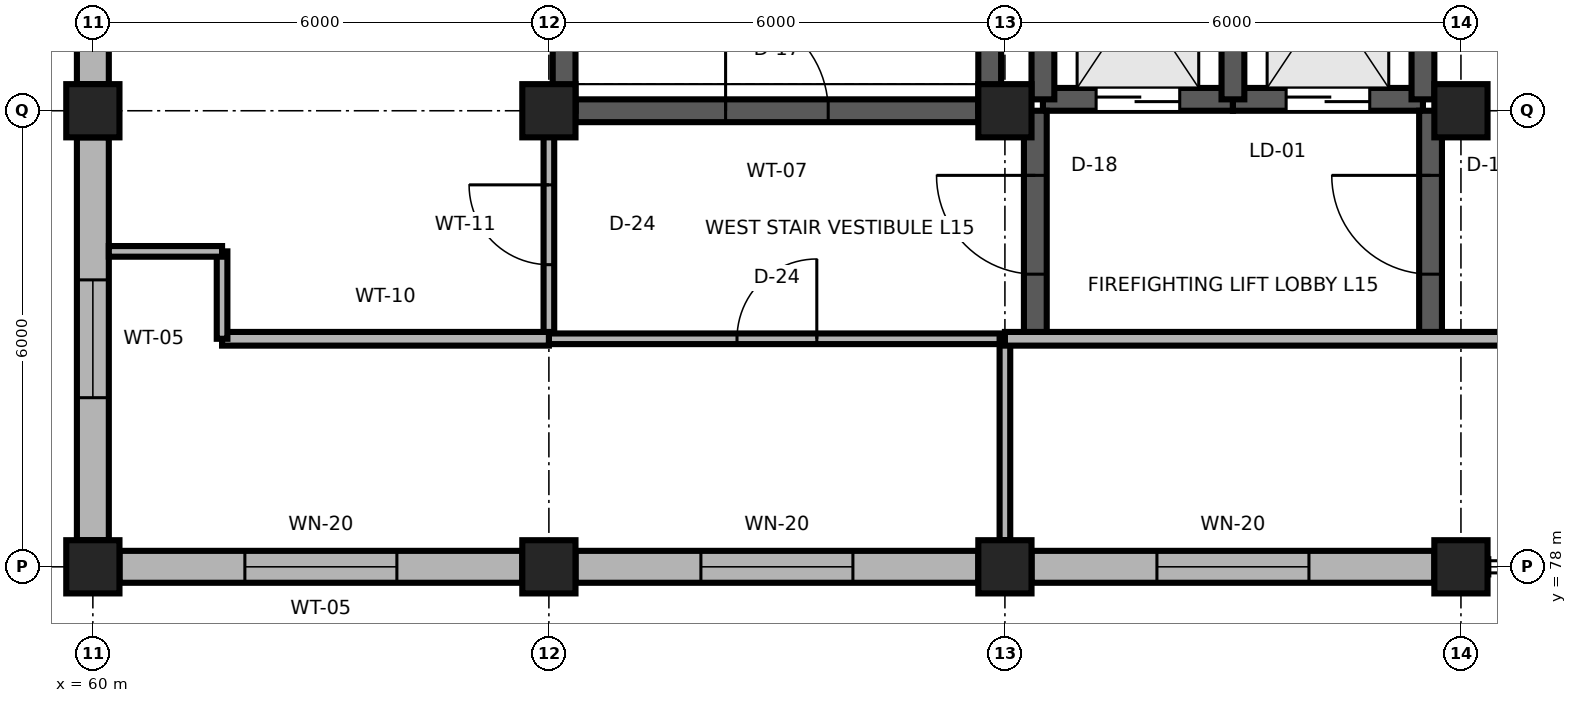
"""IFC4 building model, lengths in metres.
Left out: names, types, materials, properties, quantities, classifications, styles, units other than length and angle.
Written with IfcOpenShell. Run it as: python <this file> out.ifc"""

import sys

from ifc_helpers import new_model, si_unit, direction, frame, frame_2d, origin, origin_2d, place, context, subcontext, project, spatial, rectangle, extrude, element, fill, save


model = new_model("IFC4")
c1 = context("Model", 3, precision=1e-05, world=origin(), true_north=direction((0.0, 1.0)))
c2 = subcontext(c1, "Body", "Model", "MODEL_VIEW")
j1 = project(units=[si_unit("LENGTHUNIT", "METRE"), si_unit("PLANEANGLEUNIT", "RADIAN")], contexts=[c1])
p1 = place(None, origin())
s1 = spatial("IfcSite", under=j1, at=p1, CompositionType="ELEMENT")
p2 = place(p1, origin())
s2 = spatial("IfcBuilding", under=s1, at=p2, CompositionType="ELEMENT")
p3 = place(p2, frame((0.0, 0.0, 60.0)))
s3 = spatial("IfcBuildingStorey", under=s2, at=p3, CompositionType="ELEMENT", Elevation=60.0)
for number, where, z_axis, x_axis in (
    (1, (60.0, 78.0, 0.0), (0.0, 0.0, 1.0), (1.0, 0.0, 0.0)),
    (2, (66.0, 78.0, 0.0), (0.0, 0.0, 1.0), (1.0, 0.0, 0.0)),
    (3, (72.0, 78.0, 0.0), (0.0, 0.0, 1.0), (1.0, 0.0, 0.0)),
    (4, (78.0, 78.0, 0.0), (0.0, 0.0, 1.0), (1.0, 0.0, 0.0)),
    (5, (60.0, 84.0, 0.0), (0.0, 0.0, 1.0), (1.0, 0.0, 0.0)),
    (6, (66.0, 84.0, 0.0), (0.0, 0.0, 1.0), (1.0, 0.0, 0.0)),
    (7, (72.0, 84.0, 0.0), (0.0, 0.0, 1.0), (1.0, 0.0, 0.0)),
    (8, (78.0, 84.0, 0.0), (0.0, 0.0, 1.0), (1.0, 0.0, 0.0)),
):
    element("IfcColumn", number, at=place(p3, frame(where, z_axis=z_axis, x_axis=x_axis)), inside=s3, PredefinedType="COLUMN", context=c2, shape_type="SweptSolid", body=[
        extrude(rectangle(XDim=0.7, YDim=0.7, at=origin_2d()), origin(), (0.0, 0.0, 1.0), 3.9),
    ])
p4 = place(p3, frame((60.35, 78.0, 0.0), z_axis=(0.0, 0.0, 1.0), x_axis=(1.0, 0.0, 0.0)))
e9 = element("IfcWall", 9, at=p4, inside=s3, PredefinedType="SOLIDWALL", context=c2, shape_type="SweptSolid", body=[
    extrude(rectangle(XDim=5.3, YDim=0.42, at=frame_2d((2.65, 0.0))), origin(), (0.0, 0.0, 1.0), 3.32),
])
p5 = place(p4, frame((1.65, 0.0, 0.85)))
e10 = element("IfcOpeningElement", 10, at=p5, cuts=e9, PredefinedType="OPENING", context=c2, shape_type="SweptSolid", body=[
    extrude(rectangle(XDim=2.0, YDim=1.95, at=frame_2d((1.0, 0.975))), frame((0.0, 0.225, 0.0), z_axis=(0.0, -1.0, 0.0), x_axis=(1.0, 0.0, 0.0)), (0.0, 0.0, 1.0), 0.45),
])
p6 = place(p3, frame((66.35, 78.0, 0.0), z_axis=(0.0, 0.0, 1.0), x_axis=(1.0, 0.0, 0.0)))
e11 = element("IfcWall", 11, at=p6, inside=s3, PredefinedType="SOLIDWALL", context=c2, shape_type="SweptSolid", body=[
    extrude(rectangle(XDim=5.3, YDim=0.42, at=frame_2d((2.65, 0.0))), origin(), (0.0, 0.0, 1.0), 3.32),
])
p7 = place(p6, frame((1.65, 0.0, 0.85)))
e12 = element("IfcOpeningElement", 12, at=p7, cuts=e11, PredefinedType="OPENING", context=c2, shape_type="SweptSolid", body=[
    extrude(rectangle(XDim=2.0, YDim=1.95, at=frame_2d((1.0, 0.975))), frame((0.0, 0.225, 0.0), z_axis=(0.0, -1.0, 0.0), x_axis=(1.0, 0.0, 0.0)), (0.0, 0.0, 1.0), 0.45),
])
p8 = place(p3, frame((72.35, 78.0, 0.0), z_axis=(0.0, 0.0, 1.0), x_axis=(1.0, 0.0, 0.0)))
e13 = element("IfcWall", 13, at=p8, inside=s3, PredefinedType="SOLIDWALL", context=c2, shape_type="SweptSolid", body=[
    extrude(rectangle(XDim=5.3, YDim=0.42, at=frame_2d((2.65, 0.0))), origin(), (0.0, 0.0, 1.0), 3.32),
])
p9 = place(p8, frame((1.65, 0.0, 0.85)))
e14 = element("IfcOpeningElement", 14, at=p9, cuts=e13, PredefinedType="OPENING", context=c2, shape_type="SweptSolid", body=[
    extrude(rectangle(XDim=2.0, YDim=1.95, at=frame_2d((1.0, 0.975))), frame((0.0, 0.225, 0.0), z_axis=(0.0, -1.0, 0.0), x_axis=(1.0, 0.0, 0.0)), (0.0, 0.0, 1.0), 0.45),
])
p10 = place(p3, frame((60.0, 78.35, 0.0), z_axis=(0.0, 0.0, 1.0), x_axis=(0.0, 1.0, 0.0)))
e15 = element("IfcWall", 15, at=p10, inside=s3, PredefinedType="SOLIDWALL", context=c2, shape_type="SweptSolid", body=[
    extrude(rectangle(XDim=5.3, YDim=0.42, at=frame_2d((2.65, 0.0))), origin(), (0.0, 0.0, 1.0), 3.32),
])
p11 = place(p10, frame((1.875, 0.0, 0.85)))
e16 = element("IfcOpeningElement", 16, at=p11, cuts=e15, PredefinedType="OPENING", context=c2, shape_type="SweptSolid", body=[
    extrude(rectangle(XDim=1.55, YDim=1.9, at=frame_2d((0.775, 0.95))), frame((0.0, 0.225, 0.0), z_axis=(0.0, -1.0, 0.0), x_axis=(1.0, 0.0, 0.0)), (0.0, 0.0, 1.0), 0.45),
])
p12 = place(p3, frame((60.0, 84.35, 0.0), z_axis=(0.0, 0.0, 1.0), x_axis=(0.0, 1.0, 0.0)))
e17 = element("IfcWall", 17, at=p12, inside=s3, PredefinedType="SOLIDWALL", context=c2, shape_type="SweptSolid", body=[
    extrude(rectangle(XDim=5.3, YDim=0.42, at=frame_2d((2.65, 0.0))), origin(), (0.0, 0.0, 1.0), 3.32),
])
p13 = place(p12, frame((1.875, 0.0, 0.85)))
e18 = element("IfcOpeningElement", 18, at=p13, cuts=e17, PredefinedType="OPENING", context=c2, shape_type="SweptSolid", body=[
    extrude(rectangle(XDim=1.55, YDim=1.9, at=frame_2d((0.775, 0.95))), frame((0.0, 0.225, 0.0), z_axis=(0.0, -1.0, 0.0), x_axis=(1.0, 0.0, 0.0)), (0.0, 0.0, 1.0), 0.45),
])
p14 = place(p3, frame((66.35, 84.0, 0.0), z_axis=(0.0, 0.0, 1.0), x_axis=(1.0, 0.0, 0.0)))
e19 = element("IfcWall", 19, at=p14, inside=s3, PredefinedType="SHEAR", context=c2, shape_type="SweptSolid", body=[
    extrude(rectangle(XDim=5.3, YDim=0.3, at=frame_2d((2.65, 0.0))), origin(), (0.0, 0.0, 1.0), 3.66),
])
p15 = place(p14, frame((1.975, 0.0, 0.0)))
e20 = element("IfcOpeningElement", 20, at=p15, cuts=e19, PredefinedType="OPENING", context=c2, shape_type="SweptSolid", body=[
    extrude(rectangle(XDim=1.35, YDim=2.2, at=frame_2d((0.675, 1.1))), frame((0.0, 0.165, 0.0), z_axis=(0.0, -1.0, 0.0), x_axis=(1.0, 0.0, 0.0)), (0.0, 0.0, 1.0), 0.33),
])
for number, where, z_axis, x_axis in (
    (21, (66.2, 84.0, 0.0), (0.0, 0.0, 1.0), (0.0, 1.0, 0.0)),
    (22, (71.8, 84.0, 0.0), (0.0, 0.0, 1.0), (0.0, 1.0, 0.0)),
):
    element("IfcWall", number, at=place(p3, frame(where, z_axis=z_axis, x_axis=x_axis)), inside=s3, PredefinedType="SHEAR", context=c2, shape_type="SweptSolid", body=[
        extrude(rectangle(XDim=11.8, YDim=0.3, at=frame_2d((5.9, 0.0))), origin(), (0.0, 0.0, 1.0), 3.74),
    ])
p16 = place(p3, frame((72.5, 84.15, 0.0), z_axis=(0.0, 0.0, 1.0), x_axis=(1.0, 0.0, 0.0)))
e23 = element("IfcWall", 23, at=p16, inside=s3, PredefinedType="SHEAR", context=c2, shape_type="SweptSolid", body=[
    extrude(rectangle(XDim=2.5, YDim=0.3, at=frame_2d((1.25, 0.0))), origin(), (0.0, 0.0, 1.0), 3.74),
])
p17 = place(p16, frame((0.7, 0.0, 0.0)))
e24 = element("IfcOpeningElement", 24, at=p17, cuts=e23, PredefinedType="OPENING", context=c2, shape_type="SweptSolid", body=[
    extrude(rectangle(XDim=1.1, YDim=2.1, at=frame_2d((0.55, 1.05))), frame((0.0, 0.165, 0.0), z_axis=(0.0, -1.0, 0.0), x_axis=(1.0, 0.0, 0.0)), (0.0, 0.0, 1.0), 0.33),
])
p18 = place(p3, frame((72.5, 84.15, 0.0), z_axis=(0.0, 0.0, 1.0), x_axis=(0.0, 1.0, 0.0)))
e25 = element("IfcWall", 25, at=p18, inside=s3, PredefinedType="SHEAR", context=c2, shape_type="SweptSolid", body=[
    extrude(rectangle(XDim=3.4, YDim=0.3, at=frame_2d((1.7, 0.0))), origin(), (0.0, 0.0, 1.0), 3.74),
])
p19 = place(p3, frame((75.0, 84.15, 0.0), z_axis=(0.0, 0.0, 1.0), x_axis=(1.0, 0.0, 0.0)))
e26 = element("IfcWall", 26, at=p19, inside=s3, PredefinedType="SHEAR", context=c2, shape_type="SweptSolid", body=[
    extrude(rectangle(XDim=2.5, YDim=0.3, at=frame_2d((1.25, 0.0))), origin(), (0.0, 0.0, 1.0), 3.74),
])
p20 = place(p19, frame((0.7, 0.0, 0.0)))
e27 = element("IfcOpeningElement", 27, at=p20, cuts=e26, PredefinedType="OPENING", context=c2, shape_type="SweptSolid", body=[
    extrude(rectangle(XDim=1.1, YDim=2.1, at=frame_2d((0.55, 1.05))), frame((0.0, 0.165, 0.0), z_axis=(0.0, -1.0, 0.0), x_axis=(1.0, 0.0, 0.0)), (0.0, 0.0, 1.0), 0.33),
])
for number, where, z_axis, x_axis in (
    (28, (75.0, 84.15, 0.0), (0.0, 0.0, 1.0), (0.0, 1.0, 0.0)),
    (29, (77.5, 84.15, 0.0), (0.0, 0.0, 1.0), (0.0, 1.0, 0.0)),
):
    element("IfcWall", number, at=place(p3, frame(where, z_axis=z_axis, x_axis=x_axis)), inside=s3, PredefinedType="SHEAR", context=c2, shape_type="SweptSolid", body=[
        extrude(rectangle(XDim=3.4, YDim=0.3, at=frame_2d((1.7, 0.0))), origin(), (0.0, 0.0, 1.0), 3.74),
    ])
p21 = place(p3, frame((72.4, 81.0, 0.0), z_axis=(0.0, 0.0, 1.0), x_axis=(0.0, 1.0, 0.0)))
e30 = element("IfcWall", 30, at=p21, inside=s3, PredefinedType="SHEAR", context=c2, shape_type="SweptSolid", body=[
    extrude(rectangle(XDim=3.0, YDim=0.3, at=frame_2d((1.5, 0.0))), origin(), (0.0, 0.0, 1.0), 3.74),
])
p22 = place(p21, frame((0.85, 0.0, 0.0)))
e31 = element("IfcOpeningElement", 31, at=p22, cuts=e30, PredefinedType="OPENING", context=c2, shape_type="SweptSolid", body=[
    extrude(rectangle(XDim=1.3, YDim=2.2, at=frame_2d((0.65, 1.1))), frame((0.0, 0.165, 0.0), z_axis=(0.0, -1.0, 0.0), x_axis=(1.0, 0.0, 0.0)), (0.0, 0.0, 1.0), 0.33),
])
p23 = place(p3, frame((77.6, 81.0, 0.0), z_axis=(0.0, 0.0, 1.0), x_axis=(0.0, 1.0, 0.0)))
e32 = element("IfcWall", 32, at=p23, inside=s3, PredefinedType="SHEAR", context=c2, shape_type="SweptSolid", body=[
    extrude(rectangle(XDim=3.0, YDim=0.3, at=frame_2d((1.5, 0.0))), origin(), (0.0, 0.0, 1.0), 3.74),
])
p24 = place(p23, frame((0.85, 0.0, 0.0)))
e33 = element("IfcOpeningElement", 33, at=p24, cuts=e32, PredefinedType="OPENING", context=c2, shape_type="SweptSolid", body=[
    extrude(rectangle(XDim=1.3, YDim=2.2, at=frame_2d((0.65, 1.1))), frame((0.0, 0.165, 0.0), z_axis=(0.0, -1.0, 0.0), x_axis=(1.0, 0.0, 0.0)), (0.0, 0.0, 1.0), 0.33),
])
p25 = place(p3, frame((66.0, 81.05, 0.0), z_axis=(0.0, 0.0, 1.0), x_axis=(0.0, 1.0, 0.0)))
e34 = element("IfcWall", 34, at=p25, inside=s3, PredefinedType="PARTITIONING", context=c2, shape_type="SweptSolid", body=[
    extrude(rectangle(XDim=2.9, YDim=0.14, at=frame_2d((1.45, 0.0))), origin(), (0.0, 0.0, 1.0), 3.449),
])
p26 = place(p25, frame((0.925, 0.0, 0.0)))
e35 = element("IfcOpeningElement", 35, at=p26, cuts=e34, PredefinedType="OPENING", context=c2, shape_type="SweptSolid", body=[
    extrude(rectangle(XDim=1.05, YDim=2.25, at=frame_2d((0.525, 1.125))), frame((0.0, 0.085, 0.0), z_axis=(0.0, -1.0, 0.0), x_axis=(1.0, 0.0, 0.0)), (0.0, 0.0, 1.0), 0.17),
])
p27 = place(p3, frame((66.0, 81.0, 0.0), z_axis=(0.0, 0.0, 1.0), x_axis=(1.0, 0.0, 0.0)))
e36 = element("IfcWall", 36, at=p27, inside=s3, PredefinedType="PARTITIONING", context=c2, shape_type="SweptSolid", body=[
    extrude(rectangle(XDim=6.0, YDim=0.14, at=frame_2d((3.0, 0.0))), origin(), (0.0, 0.0, 1.0), 3.74),
])
p28 = place(p27, frame((2.475, 0.0, 0.0)))
e37 = element("IfcOpeningElement", 37, at=p28, cuts=e36, PredefinedType="OPENING", context=c2, shape_type="SweptSolid", body=[
    extrude(rectangle(XDim=1.05, YDim=2.25, at=frame_2d((0.525, 1.125))), frame((0.0, 0.085, 0.0), z_axis=(0.0, -1.0, 0.0), x_axis=(1.0, 0.0, 0.0)), (0.0, 0.0, 1.0), 0.17),
])
p29 = place(p3, frame((72.0, 78.35, 0.0), z_axis=(0.0, 0.0, 1.0), x_axis=(0.0, 1.0, 0.0)))
e38 = element("IfcWall", 38, at=p29, inside=s3, PredefinedType="PARTITIONING", context=c2, shape_type="SweptSolid", body=[
    extrude(rectangle(XDim=2.65, YDim=0.14, at=frame_2d((1.325, 0.0))), origin(), (0.0, 0.0, 1.0), 3.449),
])
p30 = place(p3, frame((61.7, 81.0, 0.0), z_axis=(0.0, 0.0, 1.0), x_axis=(1.0, 0.0, 0.0)))
e39 = element("IfcWall", 39, at=p30, inside=s3, PredefinedType="PARTITIONING", context=c2, shape_type="SweptSolid", body=[
    extrude(rectangle(XDim=4.3, YDim=0.18, at=frame_2d((2.15, 0.0))), origin(), (0.0, 0.0, 1.0), 3.74),
])
p31 = place(p3, frame((72.0, 81.0, 0.0), z_axis=(0.0, 0.0, 1.0), x_axis=(1.0, 0.0, 0.0)))
e40 = element("IfcWall", 40, at=p31, inside=s3, PredefinedType="PARTITIONING", context=c2, shape_type="SweptSolid", body=[
    extrude(rectangle(XDim=12.0, YDim=0.18, at=frame_2d((6.0, 0.0))), origin(), (0.0, 0.0, 1.0), 3.74),
])
p32 = place(p3, frame((61.7, 81.0, 0.0), z_axis=(0.0, 0.0, 1.0), x_axis=(0.0, 1.0, 0.0)))
e41 = element("IfcWall", 41, at=p32, inside=s3, PredefinedType="PARTITIONING", context=c2, shape_type="SweptSolid", body=[
    extrude(rectangle(XDim=1.15, YDim=0.14, at=frame_2d((0.575, 0.0))), origin(), (0.0, 0.0, 1.0), 3.74),
])
p33 = place(p3, frame((61.7, 82.15, 0.0), z_axis=(0.0, 0.0, 1.0), x_axis=(-1.0, 0.0, 0.0)))
e42 = element("IfcWall", 42, at=p33, inside=s3, PredefinedType="PARTITIONING", context=c2, shape_type="SweptSolid", body=[
    extrude(rectangle(XDim=1.49, YDim=0.14, at=frame_2d((0.745, 0.0))), origin(), (0.0, 0.0, 1.0), 3.74),
])
p34 = place(p5, origin())
e43 = element("IfcWindow", 43, at=p34, inside=s3, PartitioningType="SINGLE_PANEL", PredefinedType="WINDOW", context=c2, shape_type="SweptSolid", body=[
    extrude(rectangle(XDim=2.0, YDim=1.95, at=frame_2d((1.0, 0.975))), frame((0.0, 0.03, 0.0), z_axis=(0.0, -1.0, 0.0), x_axis=(1.0, 0.0, 0.0)), (0.0, 0.0, 1.0), 0.06),
])
fill(e10, e43)
p35 = place(p7, origin())
e44 = element("IfcWindow", 44, at=p35, inside=s3, PartitioningType="SINGLE_PANEL", PredefinedType="WINDOW", context=c2, shape_type="SweptSolid", body=[
    extrude(rectangle(XDim=2.0, YDim=1.95, at=frame_2d((1.0, 0.975))), frame((0.0, 0.03, 0.0), z_axis=(0.0, -1.0, 0.0), x_axis=(1.0, 0.0, 0.0)), (0.0, 0.0, 1.0), 0.06),
])
fill(e12, e44)
p36 = place(p9, origin())
e45 = element("IfcWindow", 45, at=p36, inside=s3, PartitioningType="SINGLE_PANEL", PredefinedType="WINDOW", context=c2, shape_type="SweptSolid", body=[
    extrude(rectangle(XDim=2.0, YDim=1.95, at=frame_2d((1.0, 0.975))), frame((0.0, 0.03, 0.0), z_axis=(0.0, -1.0, 0.0), x_axis=(1.0, 0.0, 0.0)), (0.0, 0.0, 1.0), 0.06),
])
fill(e14, e45)
p37 = place(p11, origin())
e46 = element("IfcWindow", 46, at=p37, inside=s3, PartitioningType="SINGLE_PANEL", PredefinedType="WINDOW", context=c2, shape_type="SweptSolid", body=[
    extrude(rectangle(XDim=1.55, YDim=1.9, at=frame_2d((0.775, 0.95))), frame((0.0, 0.03, 0.0), z_axis=(0.0, -1.0, 0.0), x_axis=(1.0, 0.0, 0.0)), (0.0, 0.0, 1.0), 0.06),
])
fill(e16, e46)
p38 = place(p15, origin())
e47 = element("IfcDoor", 47, at=p38, inside=s3, OperationType="SINGLE_SWING_LEFT", PredefinedType="DOOR", context=c2, shape_type="SweptSolid", body=[
    extrude(rectangle(XDim=1.35, YDim=2.2, at=frame_2d((0.675, 1.1))), frame((0.0, 0.025, 0.0), z_axis=(0.0, -1.0, 0.0), x_axis=(1.0, 0.0, 0.0)), (0.0, 0.0, 1.0), 0.05),
])
fill(e20, e47)
p39 = place(p17, origin())
e48 = element("IfcDoor", 48, at=p39, inside=s3, OperationType="DOUBLE_DOOR_SLIDING", PredefinedType="DOOR", context=c2, shape_type="SweptSolid", body=[
    extrude(rectangle(XDim=1.1, YDim=2.1, at=frame_2d((0.55, 1.05))), frame((0.0, 0.025, 0.0), z_axis=(0.0, -1.0, 0.0), x_axis=(1.0, 0.0, 0.0)), (0.0, 0.0, 1.0), 0.05),
])
fill(e24, e48)
p40 = place(p20, origin())
e49 = element("IfcDoor", 49, at=p40, inside=s3, OperationType="DOUBLE_DOOR_SLIDING", PredefinedType="DOOR", context=c2, shape_type="SweptSolid", body=[
    extrude(rectangle(XDim=1.1, YDim=2.1, at=frame_2d((0.55, 1.05))), frame((0.0, 0.025, 0.0), z_axis=(0.0, -1.0, 0.0), x_axis=(1.0, 0.0, 0.0)), (0.0, 0.0, 1.0), 0.05),
])
fill(e27, e49)
p41 = place(p22, origin())
e50 = element("IfcDoor", 50, at=p41, inside=s3, OperationType="SINGLE_SWING_RIGHT", PredefinedType="DOOR", context=c2, shape_type="SweptSolid", body=[
    extrude(rectangle(XDim=1.3, YDim=2.2, at=frame_2d((0.65, 1.1))), frame((0.0, 0.025, 0.0), z_axis=(0.0, -1.0, 0.0), x_axis=(1.0, 0.0, 0.0)), (0.0, 0.0, 1.0), 0.05),
])
fill(e31, e50)
p42 = place(p24, origin())
e51 = element("IfcDoor", 51, at=p42, inside=s3, OperationType="SINGLE_SWING_RIGHT", PredefinedType="DOOR", context=c2, shape_type="SweptSolid", body=[
    extrude(rectangle(XDim=1.3, YDim=2.2, at=frame_2d((0.65, 1.1))), frame((0.0, 0.025, 0.0), z_axis=(0.0, -1.0, 0.0), x_axis=(1.0, 0.0, 0.0)), (0.0, 0.0, 1.0), 0.05),
])
fill(e33, e51)
p43 = place(p26, origin())
e52 = element("IfcDoor", 52, at=p43, inside=s3, OperationType="SINGLE_SWING_RIGHT", PredefinedType="DOOR", context=c2, shape_type="SweptSolid", body=[
    extrude(rectangle(XDim=1.05, YDim=2.25, at=frame_2d((0.525, 1.125))), frame((0.0, 0.025, 0.0), z_axis=(0.0, -1.0, 0.0), x_axis=(1.0, 0.0, 0.0)), (0.0, 0.0, 1.0), 0.05),
])
fill(e35, e52)
p44 = place(p28, origin())
e53 = element("IfcDoor", 53, at=p44, inside=s3, OperationType="SINGLE_SWING_RIGHT", PredefinedType="DOOR", context=c2, shape_type="SweptSolid", body=[
    extrude(rectangle(XDim=1.05, YDim=2.25, at=frame_2d((0.525, 1.125))), frame((0.0, 0.025, 0.0), z_axis=(0.0, -1.0, 0.0), x_axis=(1.0, 0.0, 0.0)), (0.0, 0.0, 1.0), 0.05),
])
fill(e37, e53)
save(model, sys.argv[1])
